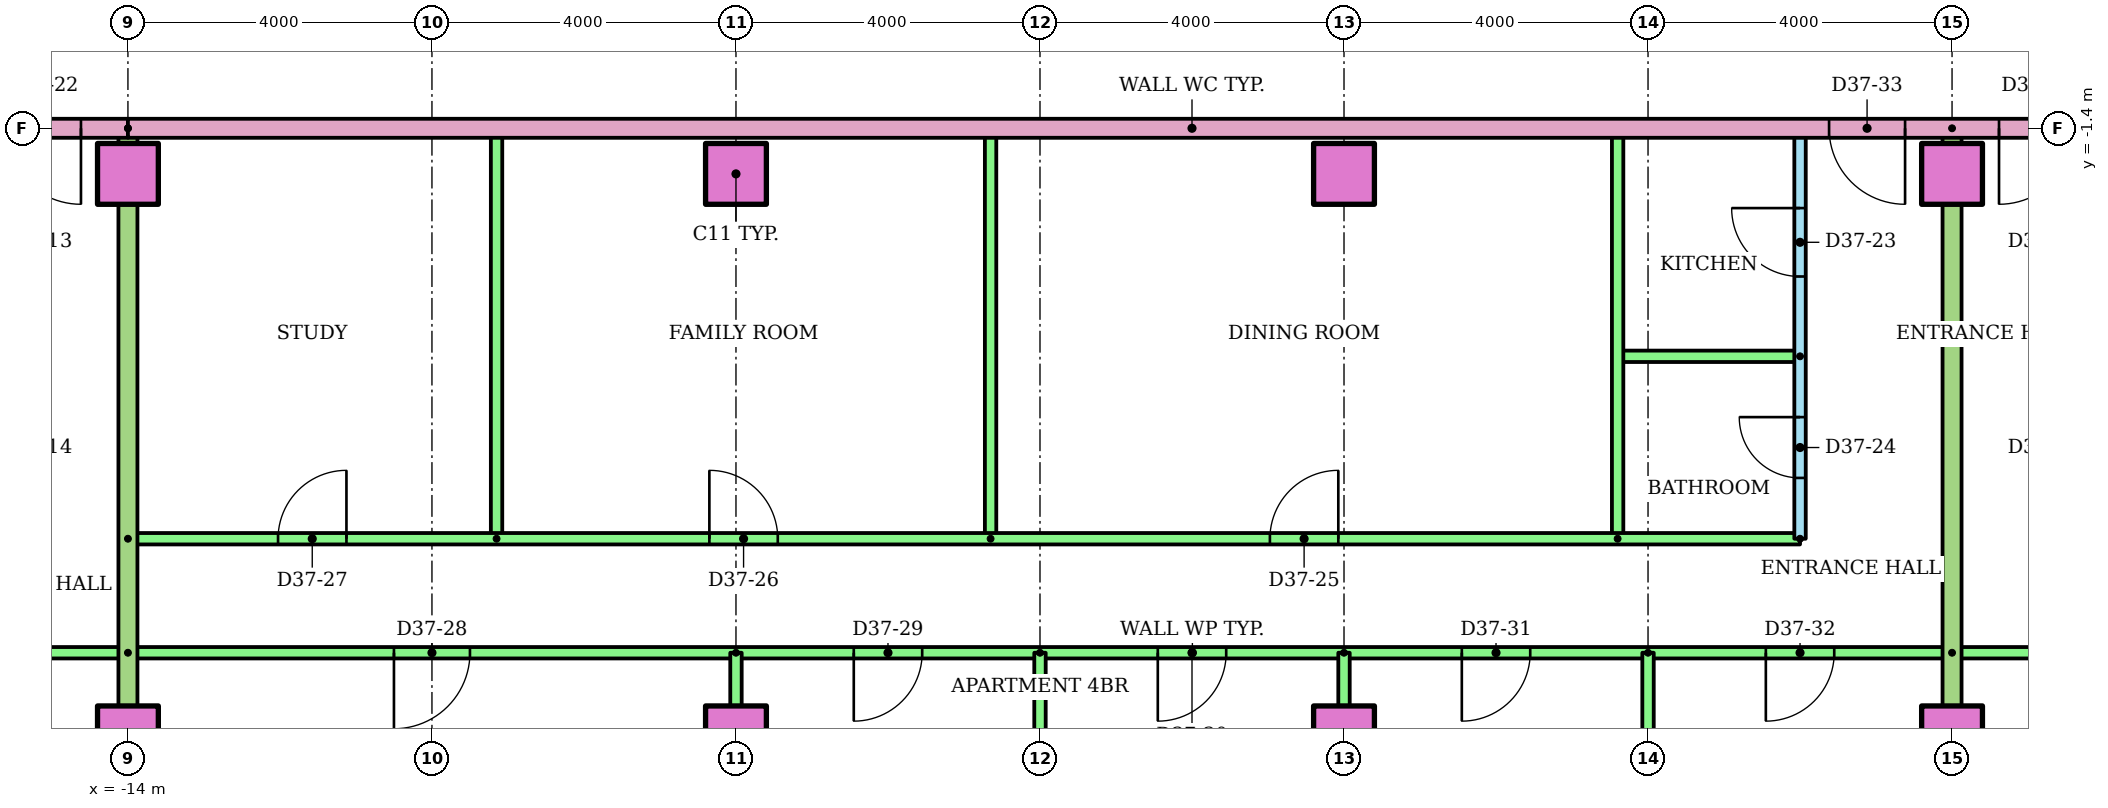
"""IFC4 building model, lengths in metres.
Left out: names, types, materials, properties, quantities, classifications, styles, units other than length and angle.
Written with IfcOpenShell. Run it as: python <this file> out.ifc"""

import sys

from ifc_helpers import new_model, si_unit, direction, frame, frame_2d, origin, origin_2d, place, context, subcontext, project, spatial, rectangle, extrude, element, fill, save


model = new_model("IFC4")
c1 = context("Model", 3, precision=1e-05, world=origin(), true_north=direction((0.0, 1.0)))
c2 = subcontext(c1, "Body", "Model", "MODEL_VIEW")
j1 = project(units=[si_unit("LENGTHUNIT", "METRE"), si_unit("PLANEANGLEUNIT", "RADIAN")], contexts=[c1])
p1 = place(None, origin())
s1 = spatial("IfcSite", under=j1, at=p1, CompositionType="ELEMENT")
p2 = place(p1, origin())
s2 = spatial("IfcBuilding", under=s1, at=p2, CompositionType="ELEMENT")
p3 = place(p2, frame((0.0, 0.0, 142.2)))
s3 = spatial("IfcBuildingStorey", under=s2, at=p3, CompositionType="ELEMENT", Elevation=142.2)
for number, where in (
    (1, (-14.0, -9.4, 0.0)),
    (2, (-6.0, -9.4, 0.0)),
    (3, (2.0, -9.4, 0.0)),
    (4, (10.0, -9.4, 0.0)),
    (5, (-14.0, -2.0, 0.0)),
    (6, (-6.0, -2.0, 0.0)),
    (7, (2.0, -2.0, 0.0)),
    (8, (10.0, -2.0, 0.0)),
):
    element("IfcColumn", number, at=place(p3, frame(where)), inside=s3, PredefinedType="COLUMN", context=c2, shape_type="SweptSolid", body=[
        extrude(rectangle(XDim=0.8, YDim=0.8, at=origin_2d()), origin(), (0.0, 0.0, 1.0), 3.2),
    ])
p4 = place(p3, frame((-14.0, -8.3, 0.0), z_axis=(0.0, 0.0, 1.0), x_axis=(-1.0, 0.0, 0.0)))
e9 = element("IfcWall", 9, at=p4, inside=s3, PredefinedType="PARTITIONING", context=c2, shape_type="SweptSolid", body=[
    extrude(rectangle(XDim=18.71, YDim=0.15, at=frame_2d((9.355, 0.0))), origin(), (0.0, 0.0, 1.0), 2.4),
])
p5 = place(p4, frame((16.618, 0.0, 0.0)))
e10 = element("IfcOpeningElement", 10, at=p5, cuts=e9, PredefinedType="OPENING", context=c2, shape_type="SweptSolid", body=[
    extrude(rectangle(XDim=0.9, YDim=2.1, at=frame_2d((0.45, 1.05))), frame((0.0, 0.085, 0.0), z_axis=(0.0, -1.0, 0.0), x_axis=(1.0, 0.0, 0.0)), (0.0, 0.0, 1.0), 0.17),
])
p6 = place(p4, frame((10.5, 0.0, 0.0)))
e11 = element("IfcOpeningElement", 11, at=p6, cuts=e9, PredefinedType="OPENING", context=c2, shape_type="SweptSolid", body=[
    extrude(rectangle(XDim=1.0, YDim=2.1, at=frame_2d((0.5, 1.05))), frame((0.0, 0.085, 0.0), z_axis=(0.0, -1.0, 0.0), x_axis=(1.0, 0.0, 0.0)), (0.0, 0.0, 1.0), 0.17),
])
p7 = place(p4, frame((5.55, 0.0, 0.0)))
e12 = element("IfcOpeningElement", 12, at=p7, cuts=e9, PredefinedType="OPENING", context=c2, shape_type="SweptSolid", body=[
    extrude(rectangle(XDim=0.9, YDim=2.1, at=frame_2d((0.45, 1.05))), frame((0.0, 0.085, 0.0), z_axis=(0.0, -1.0, 0.0), x_axis=(1.0, 0.0, 0.0)), (0.0, 0.0, 1.0), 0.17),
])
p8 = place(p4, frame((1.55, 0.0, 0.0)))
e13 = element("IfcOpeningElement", 13, at=p8, cuts=e9, PredefinedType="OPENING", context=c2, shape_type="SweptSolid", body=[
    extrude(rectangle(XDim=0.9, YDim=2.1, at=frame_2d((0.45, 1.05))), frame((0.0, 0.085, 0.0), z_axis=(0.0, -1.0, 0.0), x_axis=(1.0, 0.0, 0.0)), (0.0, 0.0, 1.0), 0.17),
])
p9 = place(p3, frame((8.0, -6.8, 0.0), z_axis=(0.0, 0.0, 1.0), x_axis=(0.0, 1.0, 0.0)))
e14 = element("IfcWall", 14, at=p9, inside=s3, PredefinedType="PARTITIONING", context=c2, shape_type="SweptSolid", body=[
    extrude(rectangle(XDim=5.4, YDim=0.15, at=frame_2d((2.7, 0.0))), origin(), (0.0, 0.0, 1.0), 2.4),
])
p10 = place(p9, frame((3.45, 0.0, 0.0)))
e15 = element("IfcOpeningElement", 15, at=p10, cuts=e14, PredefinedType="OPENING", context=c2, shape_type="SweptSolid", body=[
    extrude(rectangle(XDim=0.9, YDim=2.1, at=frame_2d((0.45, 1.05))), frame((0.0, 0.085, 0.0), z_axis=(0.0, -1.0, 0.0), x_axis=(1.0, 0.0, 0.0)), (0.0, 0.0, 1.0), 0.17),
])
p11 = place(p9, frame((0.8, 0.0, 0.0)))
e16 = element("IfcOpeningElement", 16, at=p11, cuts=e14, PredefinedType="OPENING", context=c2, shape_type="SweptSolid", body=[
    extrude(rectangle(XDim=0.8, YDim=2.1, at=frame_2d((0.4, 1.05))), frame((0.0, 0.085, 0.0), z_axis=(0.0, -1.0, 0.0), x_axis=(1.0, 0.0, 0.0)), (0.0, 0.0, 1.0), 0.17),
])
p12 = place(p3, frame((8.0, -4.4, 0.0), z_axis=(0.0, 0.0, 1.0), x_axis=(-1.0, 0.0, 0.0)))
e17 = element("IfcWall", 17, at=p12, inside=s3, PredefinedType="PARTITIONING", context=c2, shape_type="SweptSolid", body=[
    extrude(rectangle(XDim=2.4, YDim=0.15, at=frame_2d((1.2, 0.0))), origin(), (0.0, 0.0, 1.0), 2.4),
])
for number, where, z_axis, x_axis in (
    (18, (5.6, -6.8, 0.0), (0.0, 0.0, 1.0), (0.0, 1.0, 0.0)),
    (19, (-2.65, -6.8, 0.0), (0.0, 0.0, 1.0), (0.0, 1.0, 0.0)),
    (20, (-9.15, -6.8, 0.0), (0.0, 0.0, 1.0), (0.0, 1.0, 0.0)),
):
    element("IfcWall", number, at=place(p3, frame(where, z_axis=z_axis, x_axis=x_axis)), inside=s3, PredefinedType="PARTITIONING", context=c2, shape_type="SweptSolid", body=[
        extrude(rectangle(XDim=5.4, YDim=0.15, at=frame_2d((2.7, 0.0))), origin(), (0.0, 0.0, 1.0), 2.4),
    ])
p13 = place(p3, frame((-14.0, -6.8, 0.0)))
e21 = element("IfcWall", 21, at=p13, inside=s3, PredefinedType="PARTITIONING", context=c2, shape_type="SweptSolid", body=[
    extrude(rectangle(XDim=22.0, YDim=0.15, at=frame_2d((11.0, 0.0))), origin(), (0.0, 0.0, 1.0), 2.4),
])
p14 = place(p13, frame((15.025, 0.0, 0.0)))
e22 = element("IfcOpeningElement", 22, at=p14, cuts=e21, PredefinedType="OPENING", context=c2, shape_type="SweptSolid", body=[
    extrude(rectangle(XDim=0.9, YDim=2.1, at=frame_2d((0.45, 1.05))), frame((0.0, 0.085, 0.0), z_axis=(0.0, -1.0, 0.0), x_axis=(1.0, 0.0, 0.0)), (0.0, 0.0, 1.0), 0.17),
])
p15 = place(p13, frame((7.65, 0.0, 0.0)))
e23 = element("IfcOpeningElement", 23, at=p15, cuts=e21, PredefinedType="OPENING", context=c2, shape_type="SweptSolid", body=[
    extrude(rectangle(XDim=0.9, YDim=2.1, at=frame_2d((0.45, 1.05))), frame((0.0, 0.085, 0.0), z_axis=(0.0, -1.0, 0.0), x_axis=(1.0, 0.0, 0.0)), (0.0, 0.0, 1.0), 0.17),
])
p16 = place(p13, frame((1.975, 0.0, 0.0)))
e24 = element("IfcOpeningElement", 24, at=p16, cuts=e21, PredefinedType="OPENING", context=c2, shape_type="SweptSolid", body=[
    extrude(rectangle(XDim=0.9, YDim=2.1, at=frame_2d((0.45, 1.05))), frame((0.0, 0.085, 0.0), z_axis=(0.0, -1.0, 0.0), x_axis=(1.0, 0.0, 0.0)), (0.0, 0.0, 1.0), 0.17),
])
p17 = place(p3, frame((10.0, -8.3, 0.0), z_axis=(0.0, 0.0, 1.0), x_axis=(-1.0, 0.0, 0.0)))
e25 = element("IfcWall", 25, at=p17, inside=s3, PredefinedType="PARTITIONING", context=c2, shape_type="SweptSolid", body=[
    extrude(rectangle(XDim=24.0, YDim=0.15, at=frame_2d((12.0, 0.0))), origin(), (0.0, 0.0, 1.0), 2.4),
])
p18 = place(p17, frame((19.5, 0.0, 0.0)))
e26 = element("IfcOpeningElement", 26, at=p18, cuts=e25, PredefinedType="OPENING", context=c2, shape_type="SweptSolid", body=[
    extrude(rectangle(XDim=1.0, YDim=2.1, at=frame_2d((0.5, 1.05))), frame((0.0, 0.085, 0.0), z_axis=(0.0, -1.0, 0.0), x_axis=(1.0, 0.0, 0.0)), (0.0, 0.0, 1.0), 0.17),
])
p19 = place(p17, frame((13.55, 0.0, 0.0)))
e27 = element("IfcOpeningElement", 27, at=p19, cuts=e25, PredefinedType="OPENING", context=c2, shape_type="SweptSolid", body=[
    extrude(rectangle(XDim=0.9, YDim=2.1, at=frame_2d((0.45, 1.05))), frame((0.0, 0.085, 0.0), z_axis=(0.0, -1.0, 0.0), x_axis=(1.0, 0.0, 0.0)), (0.0, 0.0, 1.0), 0.17),
])
p20 = place(p17, frame((9.55, 0.0, 0.0)))
e28 = element("IfcOpeningElement", 28, at=p20, cuts=e25, PredefinedType="OPENING", context=c2, shape_type="SweptSolid", body=[
    extrude(rectangle(XDim=0.9, YDim=2.1, at=frame_2d((0.45, 1.05))), frame((0.0, 0.085, 0.0), z_axis=(0.0, -1.0, 0.0), x_axis=(1.0, 0.0, 0.0)), (0.0, 0.0, 1.0), 0.17),
])
p21 = place(p17, frame((5.55, 0.0, 0.0)))
e29 = element("IfcOpeningElement", 29, at=p21, cuts=e25, PredefinedType="OPENING", context=c2, shape_type="SweptSolid", body=[
    extrude(rectangle(XDim=0.9, YDim=2.1, at=frame_2d((0.45, 1.05))), frame((0.0, 0.085, 0.0), z_axis=(0.0, -1.0, 0.0), x_axis=(1.0, 0.0, 0.0)), (0.0, 0.0, 1.0), 0.17),
])
p22 = place(p17, frame((1.55, 0.0, 0.0)))
e30 = element("IfcOpeningElement", 30, at=p22, cuts=e25, PredefinedType="OPENING", context=c2, shape_type="SweptSolid", body=[
    extrude(rectangle(XDim=0.9, YDim=2.1, at=frame_2d((0.45, 1.05))), frame((0.0, 0.085, 0.0), z_axis=(0.0, -1.0, 0.0), x_axis=(1.0, 0.0, 0.0)), (0.0, 0.0, 1.0), 0.17),
])
p23 = place(p3, frame((-6.0, -8.3, 0.0), z_axis=(0.0, 0.0, 1.0), x_axis=(0.0, -1.0, 0.0)))
e31 = element("IfcWall", 31, at=p23, inside=s3, PredefinedType="PARTITIONING", context=c2, shape_type="SweptSolid", body=[
    extrude(rectangle(XDim=8.01, YDim=0.15, at=frame_2d((4.005, 0.0))), origin(), (0.0, 0.0, 1.0), 2.4),
])
p24 = place(p3, frame((-2.0, -8.3, 0.0), z_axis=(0.0, 0.0, 1.0), x_axis=(0.0, -1.0, 0.0)))
e32 = element("IfcWall", 32, at=p24, inside=s3, PredefinedType="PARTITIONING", context=c2, shape_type="SweptSolid", body=[
    extrude(rectangle(XDim=8.021, YDim=0.15, at=frame_2d((4.01, 0.0))), origin(), (0.0, 0.0, 1.0), 2.4),
])
p25 = place(p3, frame((2.0, -8.3, 0.0), z_axis=(0.0, 0.0, 1.0), x_axis=(0.0, -1.0, 0.0)))
e33 = element("IfcWall", 33, at=p25, inside=s3, PredefinedType="PARTITIONING", context=c2, shape_type="SweptSolid", body=[
    extrude(rectangle(XDim=8.01, YDim=0.15, at=frame_2d((4.005, 0.0))), origin(), (0.0, 0.0, 1.0), 2.4),
])
p26 = place(p3, frame((6.0, -8.3, 0.0), z_axis=(0.0, 0.0, 1.0), x_axis=(0.0, -1.0, 0.0)))
e34 = element("IfcWall", 34, at=p26, inside=s3, PredefinedType="PARTITIONING", context=c2, shape_type="SweptSolid", body=[
    extrude(rectangle(XDim=8.021, YDim=0.15, at=frame_2d((4.01, 0.0))), origin(), (0.0, 0.0, 1.0), 2.4),
])
p27 = place(p3, frame((-14.0, -1.4, 0.0), z_axis=(0.0, 0.0, 1.0), x_axis=(0.0, -1.0, 0.0)))
e35 = element("IfcWall", 35, at=p27, inside=s3, PredefinedType="PARTITIONING", context=c2, shape_type="SweptSolid", body=[
    extrude(rectangle(XDim=14.91, YDim=0.25, at=frame_2d((7.455, 0.0))), origin(), (0.0, 0.0, 1.0), 2.4),
])
p28 = place(p3, frame((32.72, -8.3, 0.0), z_axis=(0.0, 0.0, 1.0), x_axis=(-1.0, 0.0, 0.0)))
e36 = element("IfcWall", 36, at=p28, inside=s3, PredefinedType="PARTITIONING", context=c2, shape_type="SweptSolid", body=[
    extrude(rectangle(XDim=22.72, YDim=0.15, at=frame_2d((11.36, 0.0))), origin(), (0.0, 0.0, 1.0), 2.4),
])
p29 = place(p28, frame((20.27, 0.0, 0.0)))
e37 = element("IfcOpeningElement", 37, at=p29, cuts=e36, PredefinedType="OPENING", context=c2, shape_type="SweptSolid", body=[
    extrude(rectangle(XDim=0.9, YDim=2.1, at=frame_2d((0.45, 1.05))), frame((0.0, 0.085, 0.0), z_axis=(0.0, -1.0, 0.0), x_axis=(1.0, 0.0, 0.0)), (0.0, 0.0, 1.0), 0.17),
])
p30 = place(p28, frame((16.27, 0.0, 0.0)))
e38 = element("IfcOpeningElement", 38, at=p30, cuts=e36, PredefinedType="OPENING", context=c2, shape_type="SweptSolid", body=[
    extrude(rectangle(XDim=0.9, YDim=2.1, at=frame_2d((0.45, 1.05))), frame((0.0, 0.085, 0.0), z_axis=(0.0, -1.0, 0.0), x_axis=(1.0, 0.0, 0.0)), (0.0, 0.0, 1.0), 0.17),
])
p31 = place(p28, frame((12.27, 0.0, 0.0)))
e39 = element("IfcOpeningElement", 39, at=p31, cuts=e36, PredefinedType="OPENING", context=c2, shape_type="SweptSolid", body=[
    extrude(rectangle(XDim=0.9, YDim=2.1, at=frame_2d((0.45, 1.05))), frame((0.0, 0.085, 0.0), z_axis=(0.0, -1.0, 0.0), x_axis=(1.0, 0.0, 0.0)), (0.0, 0.0, 1.0), 0.17),
])
p32 = place(p28, frame((8.22, 0.0, 0.0)))
e40 = element("IfcOpeningElement", 40, at=p32, cuts=e36, PredefinedType="OPENING", context=c2, shape_type="SweptSolid", body=[
    extrude(rectangle(XDim=1.0, YDim=2.1, at=frame_2d((0.5, 1.05))), frame((0.0, 0.085, 0.0), z_axis=(0.0, -1.0, 0.0), x_axis=(1.0, 0.0, 0.0)), (0.0, 0.0, 1.0), 0.17),
])
p33 = place(p28, frame((3.02, 0.0, 0.0)))
e41 = element("IfcOpeningElement", 41, at=p33, cuts=e36, PredefinedType="OPENING", context=c2, shape_type="SweptSolid", body=[
    extrude(rectangle(XDim=0.9, YDim=2.1, at=frame_2d((0.45, 1.05))), frame((0.0, 0.085, 0.0), z_axis=(0.0, -1.0, 0.0), x_axis=(1.0, 0.0, 0.0)), (0.0, 0.0, 1.0), 0.17),
])
p34 = place(p3, frame((10.0, -1.4, 0.0), z_axis=(0.0, 0.0, 1.0), x_axis=(0.0, -1.0, 0.0)))
e42 = element("IfcWall", 42, at=p34, inside=s3, PredefinedType="PARTITIONING", context=c2, shape_type="SweptSolid", body=[
    extrude(rectangle(XDim=14.91, YDim=0.25, at=frame_2d((7.455, 0.0))), origin(), (0.0, 0.0, 1.0), 2.4),
])
p35 = place(p3, frame((-14.0, -1.4, 0.0), z_axis=(0.0, 0.0, 1.0), x_axis=(-1.0, 0.0, 0.0)))
e43 = element("IfcWall", 43, at=p35, inside=s3, PredefinedType="PARTITIONING", context=c2, shape_type="SweptSolid", body=[
    extrude(rectangle(XDim=15.0, YDim=0.25, at=frame_2d((7.5, 0.0))), origin(), (0.0, 0.0, 1.0), 2.4),
])
p36 = place(p35, frame((0.618, 0.0, 0.0)))
e44 = element("IfcOpeningElement", 44, at=p36, cuts=e43, PredefinedType="OPENING", context=c2, shape_type="SweptSolid", body=[
    extrude(rectangle(XDim=1.0, YDim=2.1, at=frame_2d((0.5, 1.05))), frame((0.0, 0.135, 0.0), z_axis=(0.0, -1.0, 0.0), x_axis=(1.0, 0.0, 0.0)), (0.0, 0.0, 1.0), 0.27),
])
p37 = place(p3, frame((14.0, -1.4, 0.0), z_axis=(0.0, 0.0, 1.0), x_axis=(-1.0, 0.0, 0.0)))
e45 = element("IfcWall", 45, at=p37, inside=s3, PredefinedType="PARTITIONING", context=c2, shape_type="SweptSolid", body=[
    extrude(rectangle(XDim=28.0, YDim=0.25, at=frame_2d((14.0, 0.0))), origin(), (0.0, 0.0, 1.0), 2.4),
])
p38 = place(p37, frame((4.618, 0.0, 0.0)))
e46 = element("IfcOpeningElement", 46, at=p38, cuts=e45, PredefinedType="OPENING", context=c2, shape_type="SweptSolid", body=[
    extrude(rectangle(XDim=1.0, YDim=2.1, at=frame_2d((0.5, 1.05))), frame((0.0, 0.135, 0.0), z_axis=(0.0, -1.0, 0.0), x_axis=(1.0, 0.0, 0.0)), (0.0, 0.0, 1.0), 0.27),
])
p39 = place(p37, frame((2.382, 0.0, 0.0)))
e47 = element("IfcOpeningElement", 47, at=p39, cuts=e45, PredefinedType="OPENING", context=c2, shape_type="SweptSolid", body=[
    extrude(rectangle(XDim=1.0, YDim=2.1, at=frame_2d((0.5, 1.05))), frame((0.0, 0.135, 0.0), z_axis=(0.0, -1.0, 0.0), x_axis=(1.0, 0.0, 0.0)), (0.0, 0.0, 1.0), 0.27),
])
p40 = place(p36, origin())
e48 = element("IfcDoor", 48, at=p40, inside=s3, OperationType="SINGLE_SWING_LEFT", PredefinedType="DOOR", context=c2, shape_type="SweptSolid", body=[
    extrude(rectangle(XDim=1.0, YDim=2.1, at=frame_2d((0.5, 1.05))), frame((0.0, 0.025, 0.0), z_axis=(0.0, -1.0, 0.0), x_axis=(1.0, 0.0, 0.0)), (0.0, 0.0, 1.0), 0.05),
])
fill(e44, e48)
p41 = place(p10, origin())
e49 = element("IfcDoor", 49, at=p41, inside=s3, OperationType="SINGLE_SWING_RIGHT", PredefinedType="DOOR", context=c2, shape_type="SweptSolid", body=[
    extrude(rectangle(XDim=0.9, YDim=2.1, at=frame_2d((0.45, 1.05))), frame((0.0, 0.025, 0.0), z_axis=(0.0, -1.0, 0.0), x_axis=(1.0, 0.0, 0.0)), (0.0, 0.0, 1.0), 0.05),
])
fill(e15, e49)
p42 = place(p11, origin())
e50 = element("IfcDoor", 50, at=p42, inside=s3, OperationType="SINGLE_SWING_RIGHT", PredefinedType="DOOR", context=c2, shape_type="SweptSolid", body=[
    extrude(rectangle(XDim=0.8, YDim=2.1, at=frame_2d((0.4, 1.05))), frame((0.0, 0.025, 0.0), z_axis=(0.0, -1.0, 0.0), x_axis=(1.0, 0.0, 0.0)), (0.0, 0.0, 1.0), 0.05),
])
fill(e16, e50)
p43 = place(p14, origin())
e51 = element("IfcDoor", 51, at=p43, inside=s3, OperationType="SINGLE_SWING_RIGHT", PredefinedType="DOOR", context=c2, shape_type="SweptSolid", body=[
    extrude(rectangle(XDim=0.9, YDim=2.1, at=frame_2d((0.45, 1.05))), frame((0.0, 0.025, 0.0), z_axis=(0.0, -1.0, 0.0), x_axis=(1.0, 0.0, 0.0)), (0.0, 0.0, 1.0), 0.05),
])
fill(e22, e51)
p44 = place(p15, origin())
e52 = element("IfcDoor", 52, at=p44, inside=s3, OperationType="SINGLE_SWING_LEFT", PredefinedType="DOOR", context=c2, shape_type="SweptSolid", body=[
    extrude(rectangle(XDim=0.9, YDim=2.1, at=frame_2d((0.45, 1.05))), frame((0.0, 0.025, 0.0), z_axis=(0.0, -1.0, 0.0), x_axis=(1.0, 0.0, 0.0)), (0.0, 0.0, 1.0), 0.05),
])
fill(e23, e52)
p45 = place(p16, origin())
e53 = element("IfcDoor", 53, at=p45, inside=s3, OperationType="SINGLE_SWING_RIGHT", PredefinedType="DOOR", context=c2, shape_type="SweptSolid", body=[
    extrude(rectangle(XDim=0.9, YDim=2.1, at=frame_2d((0.45, 1.05))), frame((0.0, 0.025, 0.0), z_axis=(0.0, -1.0, 0.0), x_axis=(1.0, 0.0, 0.0)), (0.0, 0.0, 1.0), 0.05),
])
fill(e24, e53)
p46 = place(p18, origin())
e54 = element("IfcDoor", 54, at=p46, inside=s3, OperationType="SINGLE_SWING_RIGHT", PredefinedType="DOOR", context=c2, shape_type="SweptSolid", body=[
    extrude(rectangle(XDim=1.0, YDim=2.1, at=frame_2d((0.5, 1.05))), frame((0.0, 0.025, 0.0), z_axis=(0.0, -1.0, 0.0), x_axis=(1.0, 0.0, 0.0)), (0.0, 0.0, 1.0), 0.05),
])
fill(e26, e54)
p47 = place(p19, origin())
e55 = element("IfcDoor", 55, at=p47, inside=s3, OperationType="SINGLE_SWING_RIGHT", PredefinedType="DOOR", context=c2, shape_type="SweptSolid", body=[
    extrude(rectangle(XDim=0.9, YDim=2.1, at=frame_2d((0.45, 1.05))), frame((0.0, 0.025, 0.0), z_axis=(0.0, -1.0, 0.0), x_axis=(1.0, 0.0, 0.0)), (0.0, 0.0, 1.0), 0.05),
])
fill(e27, e55)
p48 = place(p20, origin())
e56 = element("IfcDoor", 56, at=p48, inside=s3, OperationType="SINGLE_SWING_RIGHT", PredefinedType="DOOR", context=c2, shape_type="SweptSolid", body=[
    extrude(rectangle(XDim=0.9, YDim=2.1, at=frame_2d((0.45, 1.05))), frame((0.0, 0.025, 0.0), z_axis=(0.0, -1.0, 0.0), x_axis=(1.0, 0.0, 0.0)), (0.0, 0.0, 1.0), 0.05),
])
fill(e28, e56)
p49 = place(p21, origin())
e57 = element("IfcDoor", 57, at=p49, inside=s3, OperationType="SINGLE_SWING_RIGHT", PredefinedType="DOOR", context=c2, shape_type="SweptSolid", body=[
    extrude(rectangle(XDim=0.9, YDim=2.1, at=frame_2d((0.45, 1.05))), frame((0.0, 0.025, 0.0), z_axis=(0.0, -1.0, 0.0), x_axis=(1.0, 0.0, 0.0)), (0.0, 0.0, 1.0), 0.05),
])
fill(e29, e57)
p50 = place(p22, origin())
e58 = element("IfcDoor", 58, at=p50, inside=s3, OperationType="SINGLE_SWING_RIGHT", PredefinedType="DOOR", context=c2, shape_type="SweptSolid", body=[
    extrude(rectangle(XDim=0.9, YDim=2.1, at=frame_2d((0.45, 1.05))), frame((0.0, 0.025, 0.0), z_axis=(0.0, -1.0, 0.0), x_axis=(1.0, 0.0, 0.0)), (0.0, 0.0, 1.0), 0.05),
])
fill(e30, e58)
p51 = place(p38, origin())
e59 = element("IfcDoor", 59, at=p51, inside=s3, OperationType="SINGLE_SWING_LEFT", PredefinedType="DOOR", context=c2, shape_type="SweptSolid", body=[
    extrude(rectangle(XDim=1.0, YDim=2.1, at=frame_2d((0.5, 1.05))), frame((0.0, 0.025, 0.0), z_axis=(0.0, -1.0, 0.0), x_axis=(1.0, 0.0, 0.0)), (0.0, 0.0, 1.0), 0.05),
])
fill(e46, e59)
p52 = place(p39, origin())
e60 = element("IfcDoor", 60, at=p52, inside=s3, OperationType="SINGLE_SWING_RIGHT", PredefinedType="DOOR", context=c2, shape_type="SweptSolid", body=[
    extrude(rectangle(XDim=1.0, YDim=2.1, at=frame_2d((0.5, 1.05))), frame((0.0, 0.025, 0.0), z_axis=(0.0, -1.0, 0.0), x_axis=(1.0, 0.0, 0.0)), (0.0, 0.0, 1.0), 0.05),
])
fill(e47, e60)
save(model, sys.argv[1])
